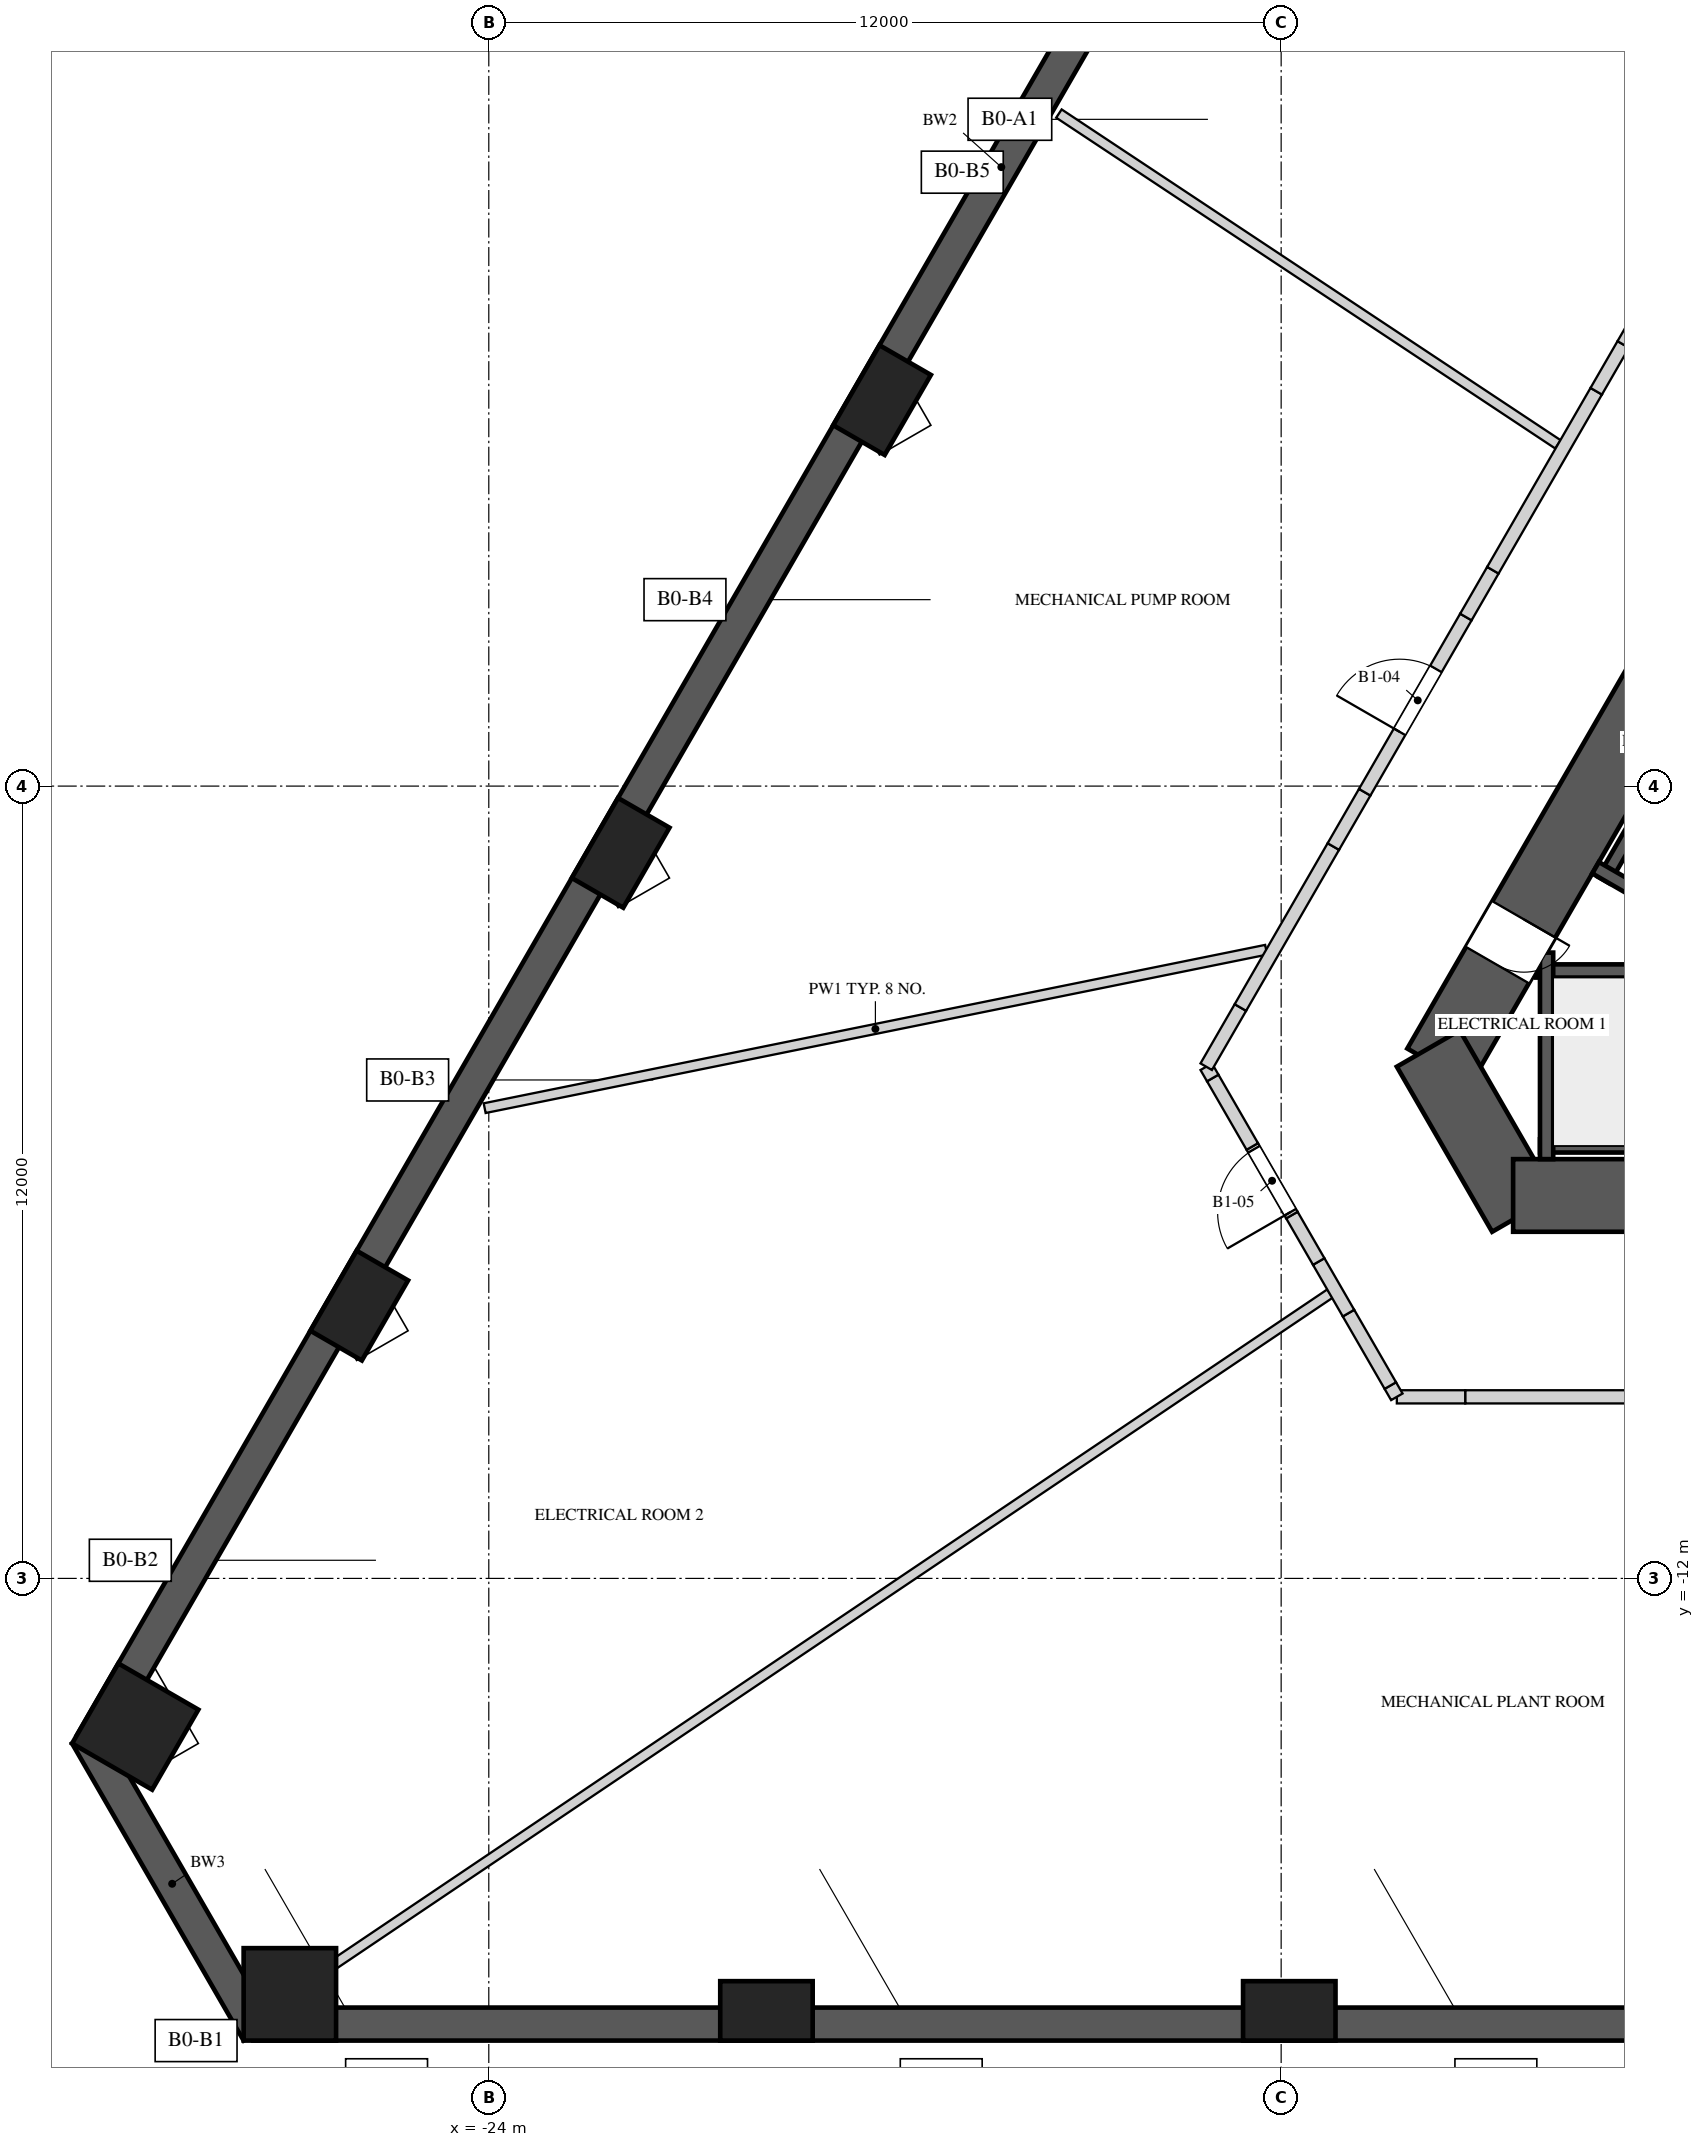
"""IFC4 building model, lengths in metres.
Left out: names, types, materials, properties, quantities, classifications, styles, units other than length and angle.
Written with IfcOpenShell. Run it as: python <this file> out.ifc"""

import sys

from ifc_helpers import new_model, si_unit, direction, frame, frame_2d, origin, origin_2d, place, context, subcontext, project, spatial, polyline, rectangle, outline, extrude, element, fill, save


model = new_model("IFC4")
c1 = context("Model", 3, precision=1e-05, world=origin(), true_north=direction((0.0, 1.0)))
c2 = subcontext(c1, "Body", "Model", "MODEL_VIEW")
j1 = project(units=[si_unit("LENGTHUNIT", "METRE"), si_unit("PLANEANGLEUNIT", "RADIAN")], contexts=[c1])
p1 = place(None, origin())
s1 = spatial("IfcSite", under=j1, at=p1, CompositionType="ELEMENT")
p2 = place(p1, origin())
s2 = spatial("IfcBuilding", under=s1, at=p2, CompositionType="ELEMENT")
p3 = place(p2, frame((0.0, 0.0, -5.0)))
s3 = spatial("IfcBuildingStorey", under=s2, at=p3, CompositionType="ELEMENT", Elevation=-5.0)
p4 = place(p3, frame((-2.454, 33.25, -0.3), z_axis=(0.0, 0.0, 1.0), x_axis=(-0.500001743317, -0.866024397277, 0.0)))
e1 = element("IfcWall", 1, at=p4, inside=s3, PredefinedType="SHEAR", context=c2, shape_type="SweptSolid", body=[
    extrude(rectangle(XDim=55.137, YDim=0.5, at=frame_2d((27.568, 0.0))), origin(), (0.0, 0.0, 1.0), 5.3),
])
p5 = place(p3, frame((-30.094, -14.375, -0.3), z_axis=(0.0, 0.0, 1.0), x_axis=(0.50000986103, -0.866019710441, 0.0)))
e2 = element("IfcWall", 2, at=p5, inside=s3, PredefinedType="SHEAR", context=c2, shape_type="SweptSolid", body=[
    extrude(rectangle(XDim=5.196, YDim=0.5, at=frame_2d((2.598, 0.0))), origin(), (0.0, 0.0, 1.0), 5.3),
])
p6 = place(p3, frame((-27.569, -18.75, -0.3), z_axis=(0.0, 0.0, 1.0), x_axis=(1.0, 0.0, 0.0)))
e3 = element("IfcWall", 3, at=p6, inside=s3, PredefinedType="SHEAR", context=c2, shape_type="SweptSolid", body=[
    extrude(rectangle(XDim=55.137, YDim=0.5, at=frame_2d((27.569, 0.0))), origin(), (0.0, 0.0, 1.0), 5.3),
])
p7 = place(p3, frame((-1.126, 10.45, -0.3), z_axis=(0.0, 0.0, 1.0), x_axis=(-0.500001757713, -0.866024388966, 0.0)))
e4 = element("IfcWall", 4, at=p7, inside=s3, PredefinedType="SHEAR", context=c2, shape_type="SweptSolid", body=[
    extrude(rectangle(XDim=16.974, YDim=1.1, at=frame_2d((8.487, 0.0))), origin(), (0.0, 0.0, 1.0), 5.3),
])
p8 = place(p7, frame((6.692, 0.0, 0.3)))
e5 = element("IfcOpeningElement", 5, at=p8, cuts=e4, PredefinedType="OPENING", context=c2, shape_type="SweptSolid", body=[
    extrude(rectangle(XDim=1.0, YDim=2.4, at=frame_2d((0.5, 1.2))), frame((0.0, 0.56, 0.0), z_axis=(0.0, -1.0, 0.0), x_axis=(1.0, 0.0, 0.0)), (0.0, 0.0, 1.0), 1.12),
])
p9 = place(p7, frame((14.397, 0.0, 0.3)))
e6 = element("IfcOpeningElement", 6, at=p9, cuts=e4, PredefinedType="OPENING", context=c2, shape_type="SweptSolid", body=[
    extrude(rectangle(XDim=0.8, YDim=2.1, at=frame_2d((0.4, 1.05))), frame((0.0, 0.56, 0.0), z_axis=(0.0, -1.0, 0.0), x_axis=(1.0, 0.0, 0.0)), (0.0, 0.0, 1.0), 1.12),
])
p10 = place(p3, frame((-9.772, -3.975, -0.3), z_axis=(0.0, 0.0, 1.0), x_axis=(0.499995765644, -0.866027848477, 0.0)))
e7 = element("IfcWall", 7, at=p10, inside=s3, PredefinedType="SHEAR", context=c2, shape_type="SweptSolid", body=[
    extrude(rectangle(XDim=2.887, YDim=1.1, at=frame_2d((1.443, 0.0))), origin(), (0.0, 0.0, 1.0), 5.3),
])
p11 = place(p3, frame((-8.487, -6.2, -0.3), z_axis=(0.0, 0.0, 1.0), x_axis=(1.0, 0.0, 0.0)))
e8 = element("IfcWall", 8, at=p11, inside=s3, PredefinedType="SHEAR", context=c2, shape_type="SweptSolid", body=[
    extrude(rectangle(XDim=16.974, YDim=1.1, at=frame_2d((8.487, 0.0))), origin(), (0.0, 0.0, 1.0), 5.3),
])
p12 = place(p11, frame((6.692, 0.0, 0.3)))
e9 = element("IfcOpeningElement", 9, at=p12, cuts=e8, PredefinedType="OPENING", context=c2, shape_type="SweptSolid", body=[
    extrude(rectangle(XDim=1.0, YDim=2.4, at=frame_2d((0.5, 1.2))), frame((0.0, 0.56, 0.0), z_axis=(0.0, -1.0, 0.0), x_axis=(1.0, 0.0, 0.0)), (0.0, 0.0, 1.0), 1.12),
])
for number, where, z_axis, x_axis in (
    (10, (-18.044, 5.846, -0.3), (0.0, 0.0, 1.0), (-0.5, -0.866, 0.0)),
    (11, (-22.003, -1.011, -0.3), (0.0, 0.0, 1.0), (-0.5, -0.866, 0.0)),
    (12, (-25.962, -7.868, -0.3), (0.0, 0.0, 1.0), (-0.5, -0.866, 0.0)),
):
    element("IfcColumn", number, at=place(p3, frame(where, z_axis=z_axis, x_axis=x_axis)), inside=s3, PredefinedType="COLUMN", context=c2, shape_type="SweptSolid", body=[
        extrude(rectangle(XDim=1.4, YDim=0.9, at=origin_2d()), origin(), (0.0, 0.0, 1.0), 5.3),
    ])
for number, where, z_axis, x_axis in (
    (13, (-29.355, -14.244, -0.3), (0.0, 0.0, 1.0), (-0.5, -0.866, 0.0)),
    (14, (-27.013, -18.3, -0.3), (0.0, 0.0, 1.0), (1.0, 0.0, 0.0)),
):
    element("IfcColumn", number, at=place(p3, frame(where, z_axis=z_axis, x_axis=x_axis)), inside=s3, PredefinedType="COLUMN", context=c2, shape_type="SweptSolid", body=[
        extrude(rectangle(XDim=1.4, YDim=1.4, at=origin_2d()), origin(), (0.0, 0.0, 1.0), 5.3),
    ])
for number, where, z_axis, x_axis in (
    (15, (-19.795, -18.55, -0.3), (0.0, 0.0, 1.0), (1.0, 0.0, 0.0)),
    (16, (-11.877, -18.55, -0.3), (0.0, 0.0, 1.0), (1.0, 0.0, 0.0)),
):
    element("IfcColumn", number, at=place(p3, frame(where, z_axis=z_axis, x_axis=x_axis)), inside=s3, PredefinedType="COLUMN", context=c2, shape_type="SweptSolid", body=[
        extrude(rectangle(XDim=1.4, YDim=0.9, at=origin_2d()), origin(), (0.0, 0.0, 1.0), 5.3),
    ])
p13 = place(p3, frame((-8.08, -5.45, 0.0), z_axis=(0.0, 0.0, 1.0), x_axis=(1.0, 0.0, 0.0)))
e17 = element("IfcWall", 17, at=p13, inside=s3, PredefinedType="SOLIDWALL", context=c2, shape_type="SweptSolid", body=[
    extrude(rectangle(XDim=6.2, YDim=0.2, at=frame_2d((3.1, 0.0))), origin(), (0.0, 0.0, 1.0), 4.65),
])
p14 = place(p3, frame((-8.141, -2.8, 0.0), z_axis=(0.0, 0.0, 1.0), x_axis=(1.0, 0.0, 0.0)))
e18 = element("IfcWall", 18, at=p14, inside=s3, PredefinedType="SOLIDWALL", context=c2, shape_type="SweptSolid", body=[
    extrude(rectangle(XDim=6.261, YDim=0.2, at=frame_2d((3.13, 0.0))), origin(), (0.0, 0.0, 1.0), 4.65),
])
p15 = place(p3, frame((-7.98, -2.522, 0.0), z_axis=(0.0, 0.0, 1.0), x_axis=(0.0, -1.0, 0.0)))
e19 = element("IfcWall", 19, at=p15, inside=s3, PredefinedType="SOLIDWALL", context=c2, shape_type="SweptSolid", body=[
    extrude(rectangle(XDim=3.128, YDim=0.2, at=frame_2d((1.564, 0.0))), origin(), (0.0, 0.0, 1.0), 4.65),
])
p16 = place(p3, frame((-4.365, 3.34, 0.0), z_axis=(0.0, 0.0, 1.0), x_axis=(-0.499996545922, -0.866027397988, 0.0)))
e20 = element("IfcWall", 20, at=p16, inside=s3, PredefinedType="SOLIDWALL", context=c2, shape_type="SweptSolid", body=[
    extrude(rectangle(XDim=5.5, YDim=0.2, at=frame_2d((2.75, 0.0))), origin(), (0.0, 0.0, 1.0), 4.65),
])
p17 = place(p3, frame((-5.03, -2.512, 0.0), z_axis=(0.0, 0.0, 1.0), x_axis=(-0.865989465428, 0.500062241894, 0.0)))
e21 = element("IfcWall", 21, at=p17, inside=s3, PredefinedType="SOLIDWALL", context=c2, shape_type="SweptSolid", body=[
    extrude(rectangle(XDim=2.55, YDim=0.2, at=frame_2d((1.275, 0.0))), origin(), (0.0, 0.0, 1.0), 4.65),
])
p18 = place(p3, frame((-12.228, -2.479, 0.0), z_axis=(0.0, 0.0, 1.0), x_axis=(-0.980068828233, -0.198658228942, 0.0)))
e22 = element("IfcWall", 22, at=p18, inside=s3, PredefinedType="PARTITIONING", context=c2, shape_type="SweptSolid", body=[
    extrude(rectangle(XDim=12.076, YDim=0.15, at=frame_2d((6.038, 0.0))), origin(), (0.0, 0.0, 1.0), 4.65),
])
p19 = place(p3, frame((-11.26, -7.686, 0.0), z_axis=(0.0, 0.0, 1.0), x_axis=(-0.829436209698, -0.558601444718, 0.0)))
e23 = element("IfcWall", 23, at=p19, inside=s3, PredefinedType="PARTITIONING", context=c2, shape_type="SweptSolid", body=[
    extrude(rectangle(XDim=19.307, YDim=0.15, at=frame_2d((9.653, 0.0))), origin(), (0.0, 0.0, 1.0), 3.55),
])
p20 = place(p3, frame((-7.808, 5.176, 0.0), z_axis=(0.0, 0.0, 1.0), x_axis=(-0.833484918625, 0.552542206917, 0.0)))
e24 = element("IfcWall", 24, at=p20, inside=s3, PredefinedType="PARTITIONING", context=c2, shape_type="SweptSolid", body=[
    extrude(rectangle(XDim=9.067, YDim=0.15, at=frame_2d((4.534, 0.0))), origin(), (0.0, 0.0, 1.0), 4.65),
])
p21 = place(p3, frame((-6.397, -9.25, 0.0), z_axis=(0.0, 0.0, 1.0), x_axis=(-1.0, 0.0, 0.0)))
e25 = element("IfcWall", 25, at=p21, inside=s3, PredefinedType="SOLIDWALL", context=c2, shape_type="SweptSolid", body=[
    extrude(rectangle(XDim=2.815, YDim=0.2, at=frame_2d((1.408, 0.0))), origin(), (0.0, 0.0, 1.0), 4.65),
])
p22 = place(p3, frame((-9.213, -9.25, 0.0), z_axis=(0.0, 0.0, 1.0), x_axis=(-1.0, 0.0, 0.0)))
e26 = element("IfcWall", 26, at=p22, inside=s3, PredefinedType="SOLIDWALL", context=c2, shape_type="SweptSolid", body=[
    extrude(rectangle(XDim=1.035, YDim=0.2, at=frame_2d((0.518, 0.0))), origin(), (0.0, 0.0, 1.0), 3.55),
])
p23 = place(p3, frame((-10.248, -9.25, 0.0), z_axis=(0.0, 0.0, 1.0), x_axis=(-0.499865263774, 0.866103179807, 0.0)))
e27 = element("IfcWall", 27, at=p23, inside=s3, PredefinedType="SOLIDWALL", context=c2, shape_type="SweptSolid", body=[
    extrude(rectangle(XDim=0.197, YDim=0.2, at=frame_2d((0.099, 0.0))), origin(), (0.0, 0.0, 1.0), 3.55),
])
p24 = place(p3, frame((-10.347, -9.079, 0.0), z_axis=(0.0, 0.0, 1.0), x_axis=(-0.499911523785, 0.866076479525, 0.0)))
e28 = element("IfcWall", 28, at=p24, inside=s3, PredefinedType="SOLIDWALL", context=c2, shape_type="SweptSolid", body=[
    extrude(rectangle(XDim=1.267, YDim=0.2, at=frame_2d((0.633, 0.0))), origin(), (0.0, 0.0, 1.0), 4.65),
])
p25 = place(p3, frame((-10.98, -7.982, 0.0), z_axis=(0.0, 0.0, 1.0), x_axis=(-0.500097243556, 0.865969252911, 0.0)))
e29 = element("IfcWall", 29, at=p25, inside=s3, PredefinedType="SOLIDWALL", context=c2, shape_type="SweptSolid", body=[
    extrude(rectangle(XDim=0.902, YDim=0.2, at=frame_2d((0.451, 0.0))), origin(), (0.0, 0.0, 1.0), 3.55),
])
p26 = place(p3, frame((-11.431, -7.201, 0.0), z_axis=(0.0, 0.0, 1.0), x_axis=(-0.500017246033, 0.866015446554, 0.0)))
e30 = element("IfcWall", 30, at=p26, inside=s3, PredefinedType="SOLIDWALL", context=c2, shape_type="SweptSolid", body=[
    extrude(rectangle(XDim=0.812, YDim=0.2, at=frame_2d((0.406, 0.0))), origin(), (0.0, 0.0, 1.0), 4.65),
])
p27 = place(p3, frame((-11.837, -6.497, 0.0), z_axis=(0.0, 0.0, 1.0), x_axis=(-0.499969057507, 0.866043267704, 0.0)))
e31 = element("IfcWall", 31, at=p27, inside=s3, PredefinedType="SOLIDWALL", context=c2, shape_type="SweptSolid", body=[
    extrude(outline(polyline([(0.0, 0.0), (1.2, 0.0), (1.2, 3.55), (0.228, 3.55), (0.228, 4.65), (0.0, 4.65), (0.0, 0.0)])), frame((0.0, 0.1, 0.0), z_axis=(0.0, -1.0, 0.0), x_axis=(1.0, 0.0, 0.0)), (0.0, 0.0, 1.0), 0.2),
])
p28 = place(p27, frame((0.05, 0.0, 0.0)))
e32 = element("IfcOpeningElement", 32, at=p28, cuts=e31, PredefinedType="OPENING", context=c2, shape_type="SweptSolid", body=[
    extrude(rectangle(XDim=1.1, YDim=2.4, at=frame_2d((0.55, 1.2))), frame((0.0, 0.11, 0.0), z_axis=(0.0, -1.0, 0.0), x_axis=(1.0, 0.0, 0.0)), (0.0, 0.0, 1.0), 0.22),
])
p29 = place(p3, frame((-12.437, -5.458, 0.0), z_axis=(0.0, 0.0, 1.0), x_axis=(-0.500063610975, 0.865988674856, 0.0)))
e33 = element("IfcWall", 33, at=p29, inside=s3, PredefinedType="SOLIDWALL", context=c2, shape_type="SweptSolid", body=[
    extrude(rectangle(XDim=1.198, YDim=0.2, at=frame_2d((0.599, 0.0))), origin(), (0.0, 0.0, 1.0), 4.65),
])
p30 = place(p3, frame((-13.036, -4.421, 0.0), z_axis=(0.0, 0.0, 1.0), x_axis=(-0.499865263774, 0.866103179807, 0.0)))
e34 = element("IfcWall", 34, at=p30, inside=s3, PredefinedType="SOLIDWALL", context=c2, shape_type="SweptSolid", body=[
    extrude(rectangle(XDim=0.197, YDim=0.2, at=frame_2d((0.099, 0.0))), origin(), (0.0, 0.0, 1.0), 3.55),
])
p31 = place(p3, frame((-13.135, -4.25, 0.0), z_axis=(0.0, 0.0, 1.0), x_axis=(0.500171514983, 0.865926356915, 0.0)))
e35 = element("IfcWall", 35, at=p31, inside=s3, PredefinedType="SOLIDWALL", context=c2, shape_type="SweptSolid", body=[
    extrude(rectangle(XDim=1.035, YDim=0.2, at=frame_2d((0.518, 0.0))), origin(), (0.0, 0.0, 1.0), 3.55),
])
p32 = place(p3, frame((-12.617, -3.354, 0.0), z_axis=(0.0, 0.0, 1.0), x_axis=(0.49993514545, 0.866062844338, 0.0)))
e36 = element("IfcWall", 36, at=p32, inside=s3, PredefinedType="SOLIDWALL", context=c2, shape_type="SweptSolid", body=[
    extrude(rectangle(XDim=2.815, YDim=0.2, at=frame_2d((1.408, 0.0))), origin(), (0.0, 0.0, 1.0), 4.65),
])
p33 = place(p3, frame((-11.209, -0.915, 0.0), z_axis=(0.0, 0.0, 1.0), x_axis=(0.500174821557, 0.865924446982, 0.0)))
e37 = element("IfcWall", 37, at=p33, inside=s3, PredefinedType="SOLIDWALL", context=c2, shape_type="SweptSolid", body=[
    extrude(rectangle(XDim=0.95, YDim=0.2, at=frame_2d((0.475, 0.0))), origin(), (0.0, 0.0, 1.0), 3.75),
])
p34 = place(p3, frame((-10.734, -0.093, 0.0), z_axis=(0.0, 0.0, 1.0), x_axis=(0.499952348839, 0.866052913447, 0.0)))
e38 = element("IfcWall", 38, at=p34, inside=s3, PredefinedType="SOLIDWALL", context=c2, shape_type="SweptSolid", body=[
    extrude(rectangle(XDim=3.064, YDim=0.2, at=frame_2d((1.532, 0.0))), origin(), (0.0, 0.0, 1.0), 4.65),
])
p35 = place(p34, frame((1.057, 0.0, 0.0)))
e39 = element("IfcOpeningElement", 39, at=p35, cuts=e38, PredefinedType="OPENING", context=c2, shape_type="SweptSolid", body=[
    extrude(rectangle(XDim=1.1, YDim=2.4, at=frame_2d((0.55, 1.2))), frame((0.0, 0.11, 0.0), z_axis=(0.0, -1.0, 0.0), x_axis=(1.0, 0.0, 0.0)), (0.0, 0.0, 1.0), 0.22),
])
p36 = place(p3, frame((-9.202, 2.561, 0.0), z_axis=(0.0, 0.0, 1.0), x_axis=(0.500118501653, 0.865956976012, 0.0)))
e40 = element("IfcWall", 40, at=p36, inside=s3, PredefinedType="SOLIDWALL", context=c2, shape_type="SweptSolid", body=[
    extrude(rectangle(XDim=0.818, YDim=0.2, at=frame_2d((0.409, 0.0))), origin(), (0.0, 0.0, 1.0), 3.75),
])
p37 = place(p3, frame((-8.793, 3.27, 0.0), z_axis=(0.0, 0.0, 1.0), x_axis=(0.499947505232, 0.866055709532, 0.0)))
e41 = element("IfcWall", 41, at=p37, inside=s3, PredefinedType="SOLIDWALL", context=c2, shape_type="SweptSolid", body=[
    extrude(rectangle(XDim=3.13, YDim=0.2, at=frame_2d((1.565, 0.0))), origin(), (0.0, 0.0, 1.0), 4.65),
])
p38 = place(p3, frame((-7.228, 5.98, 0.0), z_axis=(0.0, 0.0, 1.0), x_axis=(0.500118501653, 0.865956976012, 0.0)))
e42 = element("IfcWall", 42, at=p38, inside=s3, PredefinedType="SOLIDWALL", context=c2, shape_type="SweptSolid", body=[
    extrude(rectangle(XDim=0.818, YDim=0.2, at=frame_2d((0.409, 0.0))), origin(), (0.0, 0.0, 1.0), 3.75),
])
p39 = place(p3, frame((-6.819, 6.689, 0.0), z_axis=(0.0, 0.0, 1.0), x_axis=(0.499995339376, 0.86602809458, 0.0)))
e43 = element("IfcWall", 43, at=p39, inside=s3, PredefinedType="SOLIDWALL", context=c2, shape_type="SweptSolid", body=[
    extrude(rectangle(XDim=2.349, YDim=0.2, at=frame_2d((1.175, 0.0))), origin(), (0.0, 0.0, 1.0), 4.65),
])
p40 = place(p9, origin())
e44 = element("IfcDoor", 44, at=p40, inside=s3, OperationType="SINGLE_SWING_RIGHT", PredefinedType="DOOR", context=c2, shape_type="SweptSolid", body=[
    extrude(rectangle(XDim=0.8, YDim=2.1, at=frame_2d((0.4, 1.05))), frame((0.0, 0.025, 0.0), z_axis=(0.0, -1.0, 0.0), x_axis=(1.0, 0.0, 0.0)), (0.0, 0.0, 1.0), 0.05),
])
fill(e6, e44)
p41 = place(p35, origin())
e45 = element("IfcDoor", 45, at=p41, inside=s3, OperationType="SINGLE_SWING_RIGHT", PredefinedType="DOOR", context=c2, shape_type="SweptSolid", body=[
    extrude(rectangle(XDim=1.1, YDim=2.4, at=frame_2d((0.55, 1.2))), frame((0.0, 0.025, 0.0), z_axis=(0.0, -1.0, 0.0), x_axis=(1.0, 0.0, 0.0)), (0.0, 0.0, 1.0), 0.05),
])
fill(e39, e45)
p42 = place(p28, origin())
e46 = element("IfcDoor", 46, at=p42, inside=s3, OperationType="SINGLE_SWING_LEFT", PredefinedType="DOOR", context=c2, shape_type="SweptSolid", body=[
    extrude(rectangle(XDim=1.1, YDim=2.4, at=frame_2d((0.55, 1.2))), frame((0.0, 0.025, 0.0), z_axis=(0.0, -1.0, 0.0), x_axis=(1.0, 0.0, 0.0)), (0.0, 0.0, 1.0), 0.05),
])
fill(e32, e46)
save(model, sys.argv[1])
